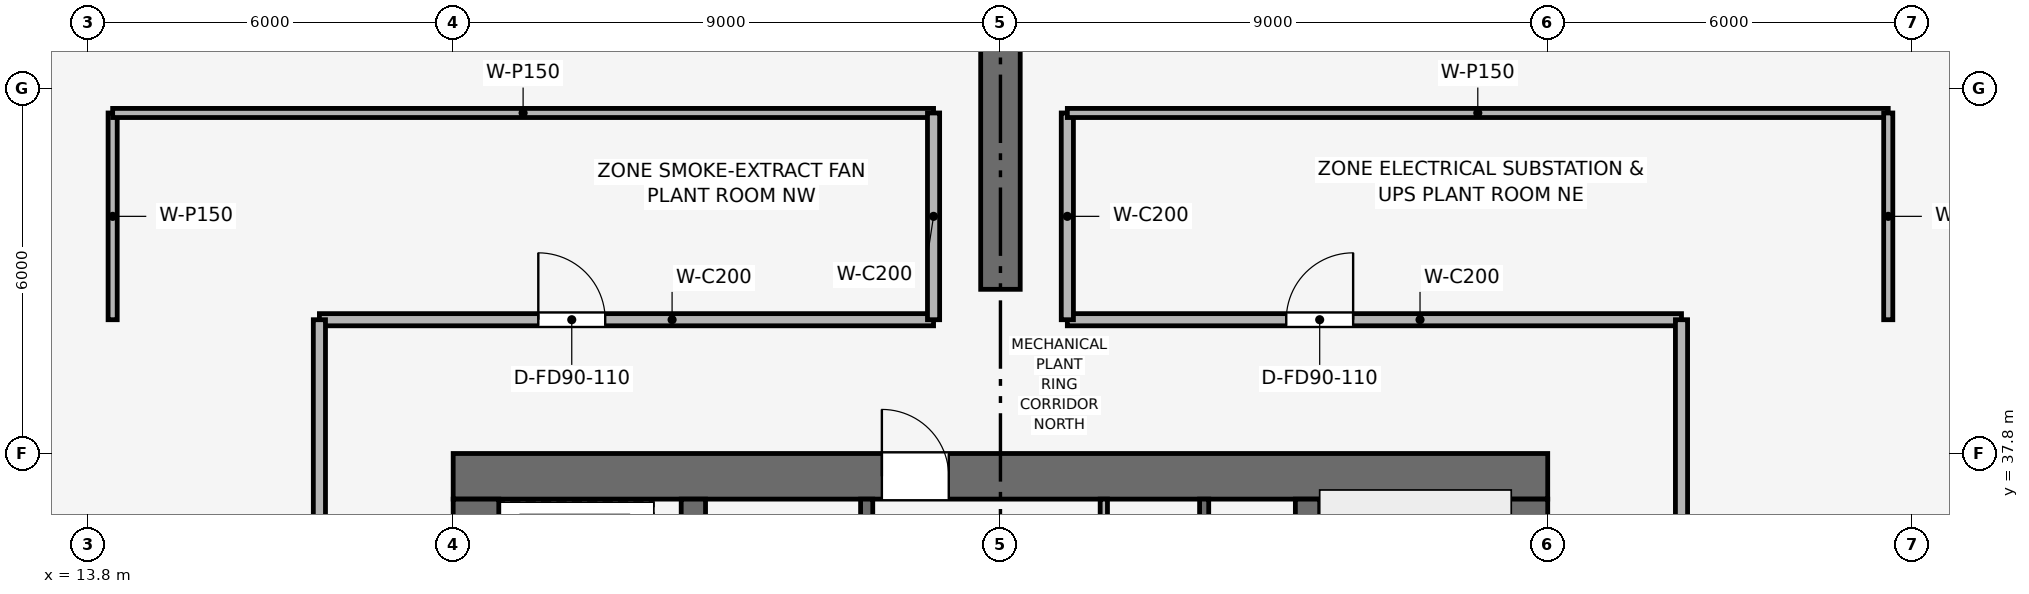
"""IFC4 building model, lengths in metres.
Left out: names, types, materials, properties, quantities, classifications, styles, units other than length and angle.
Written with IfcOpenShell. Run it as: python <this file> out.ifc"""

import sys

from ifc_helpers import new_model, si_unit, direction, frame, frame_2d, origin, place, context, subcontext, project, spatial, rectangle, extrude, element, fill, save


model = new_model("IFC4")
c1 = context("Model", 3, precision=1e-05, world=origin(), true_north=direction((0.0, 1.0)))
c2 = subcontext(c1, "Body", "Model", "MODEL_VIEW")
j1 = project(units=[si_unit("LENGTHUNIT", "METRE"), si_unit("PLANEANGLEUNIT", "RADIAN")], contexts=[c1])
p1 = place(None, origin())
s1 = spatial("IfcSite", under=j1, at=p1, CompositionType="ELEMENT")
p2 = place(p1, origin())
s2 = spatial("IfcBuilding", under=s1, at=p2, CompositionType="ELEMENT")
p3 = place(p2, frame((0.0, 0.0, 194.55)))
s3 = spatial("IfcBuildingStorey", under=s2, at=p3, CompositionType="ELEMENT", Elevation=194.55)
p4 = place(p3, frame((19.8, 37.425, 0.0), z_axis=(0.0, 0.0, 1.0), x_axis=(1.0, 0.0, 0.0)))
e1 = element("IfcWall", 1, at=p4, inside=s3, PredefinedType="SHEAR", context=c2, shape_type="SweptSolid", body=[
    extrude(rectangle(XDim=18.0, YDim=0.75, at=frame_2d((9.0, 0.0))), origin(), (0.0, 0.0, 1.0), 5.4),
])
p5 = place(p4, frame((7.05, 0.0, 0.0)))
e2 = element("IfcOpeningElement", 2, at=p5, cuts=e1, PredefinedType="OPENING", context=c2, shape_type="SweptSolid", body=[
    extrude(rectangle(XDim=1.1, YDim=2.15, at=frame_2d((0.55, 1.075))), frame((0.0, 0.385, 0.0), z_axis=(0.0, -1.0, 0.0), x_axis=(1.0, 0.0, 0.0)), (0.0, 0.0, 1.0), 0.77),
])
p6 = place(p3, frame((20.175, 20.55, 0.0), z_axis=(0.0, 0.0, 1.0), x_axis=(0.0, 1.0, 0.0)))
e3 = element("IfcWall", 3, at=p6, inside=s3, PredefinedType="SHEAR", context=c2, shape_type="SweptSolid", body=[
    extrude(rectangle(XDim=16.5, YDim=0.75, at=frame_2d((8.25, 0.0))), origin(), (0.0, 0.0, 1.0), 5.4),
])
p7 = place(p6, frame((10.25, 0.0, 0.0)))
e4 = element("IfcOpeningElement", 4, at=p7, cuts=e3, PredefinedType="OPENING", context=c2, shape_type="SweptSolid", body=[
    extrude(rectangle(XDim=1.1, YDim=2.15, at=frame_2d((0.55, 1.075))), frame((0.0, 0.385, 0.0), z_axis=(0.0, -1.0, 0.0), x_axis=(1.0, 0.0, 0.0)), (0.0, 0.0, 1.0), 0.77),
])
p8 = place(p3, frame((37.425, 20.55, 0.0), z_axis=(0.0, 0.0, 1.0), x_axis=(0.0, 1.0, 0.0)))
e5 = element("IfcWall", 5, at=p8, inside=s3, PredefinedType="SHEAR", context=c2, shape_type="SweptSolid", body=[
    extrude(rectangle(XDim=16.5, YDim=0.75, at=frame_2d((8.25, 0.0))), origin(), (0.0, 0.0, 1.0), 5.4),
])
p9 = place(p8, frame((4.75, 0.0, 0.0)))
e6 = element("IfcOpeningElement", 6, at=p9, cuts=e5, PredefinedType="OPENING", context=c2, shape_type="SweptSolid", body=[
    extrude(rectangle(XDim=1.1, YDim=2.15, at=frame_2d((0.55, 1.075))), frame((0.0, 0.385, 0.0), z_axis=(0.0, -1.0, 0.0), x_axis=(1.0, 0.0, 0.0)), (0.0, 0.0, 1.0), 0.77),
])
for number, where, z_axis, x_axis in (
    (7, (23.75, 20.55, 0.0), (0.0, 0.0, 1.0), (0.0, 1.0, 0.0)),
    (8, (33.85, 20.55, 0.0), (0.0, 0.0, 1.0), (0.0, 1.0, 0.0)),
):
    element("IfcWall", number, at=place(p3, frame(where, z_axis=z_axis, x_axis=x_axis)), inside=s3, PredefinedType="SHEAR", context=c2, shape_type="SweptSolid", body=[
        extrude(rectangle(XDim=16.5, YDim=0.4, at=frame_2d((8.25, 0.0))), origin(), (0.0, 0.0, 1.0), 5.4),
    ])
p10 = place(p3, frame((28.8, 40.5, 0.0), z_axis=(0.0, 0.0, 1.0), x_axis=(0.0, 1.0, 0.0)))
e9 = element("IfcWall", 9, at=p10, inside=s3, PredefinedType="SHEAR", context=c2, shape_type="SweptSolid", body=[
    extrude(rectangle(XDim=12.35, YDim=0.65, at=frame_2d((6.175, 0.0))), origin(), (0.0, 0.0, 1.0), 5.15),
])
p11 = place(p3, frame((32.15, 34.0, 0.0), z_axis=(0.0, 0.0, 1.0), x_axis=(0.0, 1.0, 0.0)))
e10 = element("IfcWall", 10, at=p11, inside=s3, PredefinedType="SHEAR", context=c2, shape_type="SweptSolid", body=[
    extrude(rectangle(XDim=3.05, YDim=0.15, at=frame_2d((1.525, 0.0))), origin(), (0.0, 0.0, 1.0), 5.15),
])
p12 = place(p3, frame((26.6, 34.0, 0.0), z_axis=(0.0, 0.0, 1.0), x_axis=(0.0, 1.0, 0.0)))
e11 = element("IfcWall", 11, at=p12, inside=s3, PredefinedType="SHEAR", context=c2, shape_type="SweptSolid", body=[
    extrude(rectangle(XDim=3.05, YDim=0.2, at=frame_2d((1.525, 0.0))), origin(), (0.0, 0.0, 1.0), 5.15),
])
p13 = place(p12, frame((0.75, 0.0, 0.0)))
e12 = element("IfcOpeningElement", 12, at=p13, cuts=e11, PredefinedType="OPENING", context=c2, shape_type="SweptSolid", body=[
    extrude(rectangle(XDim=1.1, YDim=2.15, at=frame_2d((0.55, 1.075))), frame((0.0, 0.11, 0.0), z_axis=(0.0, -1.0, 0.0), x_axis=(1.0, 0.0, 0.0)), (0.0, 0.0, 1.0), 0.22),
])
p14 = place(p3, frame((30.5, 33.925, 0.0), z_axis=(0.0, 0.0, 1.0), x_axis=(0.0, 1.0, 0.0)))
e13 = element("IfcWall", 13, at=p14, inside=s3, PredefinedType="PARTITIONING", context=c2, shape_type="SweptSolid", body=[
    extrude(rectangle(XDim=3.125, YDim=0.12, at=frame_2d((1.562, 0.0))), origin(), (0.0, 0.0, 1.0), 5.15),
])
p15 = place(p14, frame((0.85, 0.0, 0.0)))
e14 = element("IfcOpeningElement", 14, at=p15, cuts=e13, PredefinedType="OPENING", context=c2, shape_type="SweptSolid", body=[
    extrude(rectangle(XDim=0.9, YDim=2.1, at=frame_2d((0.45, 1.05))), frame((0.0, 0.07, 0.0), z_axis=(0.0, -1.0, 0.0), x_axis=(1.0, 0.0, 0.0)), (0.0, 0.0, 1.0), 0.14),
])
p16 = place(p3, frame((17.6, 40.0, 0.0), z_axis=(0.0, 0.0, 1.0), x_axis=(1.0, 0.0, 0.0)))
e15 = element("IfcWall", 15, at=p16, inside=s3, PredefinedType="PARTITIONING", context=c2, shape_type="SweptSolid", body=[
    extrude(rectangle(XDim=10.1, YDim=0.2, at=frame_2d((5.05, 0.0))), origin(), (0.0, 0.0, 1.0), 4.685),
])
p17 = place(p16, frame((3.6, 0.0, 0.0)))
e16 = element("IfcOpeningElement", 16, at=p17, cuts=e15, PredefinedType="OPENING", context=c2, shape_type="SweptSolid", body=[
    extrude(rectangle(XDim=1.1, YDim=2.15, at=frame_2d((0.55, 1.075))), frame((0.0, 0.11, 0.0), z_axis=(0.0, -1.0, 0.0), x_axis=(1.0, 0.0, 0.0)), (0.0, 0.0, 1.0), 0.22),
])
p18 = place(p3, frame((29.9, 40.0, 0.0), z_axis=(0.0, 0.0, 1.0), x_axis=(1.0, 0.0, 0.0)))
e17 = element("IfcWall", 17, at=p18, inside=s3, PredefinedType="PARTITIONING", context=c2, shape_type="SweptSolid", body=[
    extrude(rectangle(XDim=10.1, YDim=0.2, at=frame_2d((5.05, 0.0))), origin(), (0.0, 0.0, 1.0), 4.685),
])
p19 = place(p18, frame((3.6, 0.0, 0.0)))
e18 = element("IfcOpeningElement", 18, at=p19, cuts=e17, PredefinedType="OPENING", context=c2, shape_type="SweptSolid", body=[
    extrude(rectangle(XDim=1.1, YDim=2.15, at=frame_2d((0.55, 1.075))), frame((0.0, 0.11, 0.0), z_axis=(0.0, -1.0, 0.0), x_axis=(1.0, 0.0, 0.0)), (0.0, 0.0, 1.0), 0.22),
])
for number, where, z_axis, x_axis in (
    (19, (17.6, 29.9, 0.0), (0.0, 0.0, 1.0), (0.0, 1.0, 0.0)),
    (20, (40.0, 29.9, 0.0), (0.0, 0.0, 1.0), (0.0, 1.0, 0.0)),
):
    element("IfcWall", number, at=place(p3, frame(where, z_axis=z_axis, x_axis=x_axis)), inside=s3, PredefinedType="PARTITIONING", context=c2, shape_type="SweptSolid", body=[
        extrude(rectangle(XDim=10.1, YDim=0.2, at=frame_2d((5.05, 0.0))), origin(), (0.0, 0.0, 1.0), 4.685),
    ])
p20 = place(p3, frame((14.2, 40.0, 0.0), z_axis=(0.0, 0.0, 1.0), x_axis=(0.0, 1.0, 0.0)))
e21 = element("IfcWall", 21, at=p20, inside=s3, PredefinedType="PARTITIONING", context=c2, shape_type="SweptSolid", body=[
    extrude(rectangle(XDim=3.4, YDim=0.15, at=frame_2d((1.7, 0.0))), origin(), (0.0, 0.0, 1.0), 4.685),
])
p21 = place(p3, frame((14.2, 43.4, 0.0), z_axis=(0.0, 0.0, 1.0), x_axis=(1.0, 0.0, 0.0)))
e22 = element("IfcWall", 22, at=p21, inside=s3, PredefinedType="PARTITIONING", context=c2, shape_type="SweptSolid", body=[
    extrude(rectangle(XDim=13.5, YDim=0.15, at=frame_2d((6.75, 0.0))), origin(), (0.0, 0.0, 1.0), 4.685),
])
for number, where, z_axis, x_axis in (
    (23, (27.7, 40.0, 0.0), (0.0, 0.0, 1.0), (0.0, 1.0, 0.0)),
    (24, (29.9, 40.0, 0.0), (0.0, 0.0, 1.0), (0.0, 1.0, 0.0)),
):
    element("IfcWall", number, at=place(p3, frame(where, z_axis=z_axis, x_axis=x_axis)), inside=s3, PredefinedType="PARTITIONING", context=c2, shape_type="SweptSolid", body=[
        extrude(rectangle(XDim=3.4, YDim=0.2, at=frame_2d((1.7, 0.0))), origin(), (0.0, 0.0, 1.0), 5.15),
    ])
p22 = place(p3, frame((29.9, 43.4, 0.0), z_axis=(0.0, 0.0, 1.0), x_axis=(1.0, 0.0, 0.0)))
e25 = element("IfcWall", 25, at=p22, inside=s3, PredefinedType="PARTITIONING", context=c2, shape_type="SweptSolid", body=[
    extrude(rectangle(XDim=13.5, YDim=0.15, at=frame_2d((6.75, 0.0))), origin(), (0.0, 0.0, 1.0), 4.685),
])
p23 = place(p3, frame((43.4, 40.0, 0.0), z_axis=(0.0, 0.0, 1.0), x_axis=(0.0, 1.0, 0.0)))
e26 = element("IfcWall", 26, at=p23, inside=s3, PredefinedType="PARTITIONING", context=c2, shape_type="SweptSolid", body=[
    extrude(rectangle(XDim=3.4, YDim=0.15, at=frame_2d((1.7, 0.0))), origin(), (0.0, 0.0, 1.0), 4.685),
])
p24 = place(p17, origin())
e27 = element("IfcDoor", 27, at=p24, inside=s3, OperationType="SINGLE_SWING_LEFT", PredefinedType="DOOR", context=c2, shape_type="SweptSolid", body=[
    extrude(rectangle(XDim=1.1, YDim=2.15, at=frame_2d((0.55, 1.075))), frame((0.0, 0.025, 0.0), z_axis=(0.0, -1.0, 0.0), x_axis=(1.0, 0.0, 0.0)), (0.0, 0.0, 1.0), 0.05),
])
fill(e16, e27)
p25 = place(p19, origin())
e28 = element("IfcDoor", 28, at=p25, inside=s3, OperationType="SINGLE_SWING_RIGHT", PredefinedType="DOOR", context=c2, shape_type="SweptSolid", body=[
    extrude(rectangle(XDim=1.1, YDim=2.15, at=frame_2d((0.55, 1.075))), frame((0.0, 0.025, 0.0), z_axis=(0.0, -1.0, 0.0), x_axis=(1.0, 0.0, 0.0)), (0.0, 0.0, 1.0), 0.05),
])
fill(e18, e28)
p26 = place(p5, origin())
e29 = element("IfcDoor", 29, at=p26, inside=s3, OperationType="SINGLE_SWING_LEFT", PredefinedType="DOOR", context=c2, shape_type="SweptSolid", body=[
    extrude(rectangle(XDim=1.1, YDim=2.15, at=frame_2d((0.55, 1.075))), frame((0.0, 0.025, 0.0), z_axis=(0.0, -1.0, 0.0), x_axis=(1.0, 0.0, 0.0)), (0.0, 0.0, 1.0), 0.05),
])
fill(e2, e29)
save(model, sys.argv[1])
